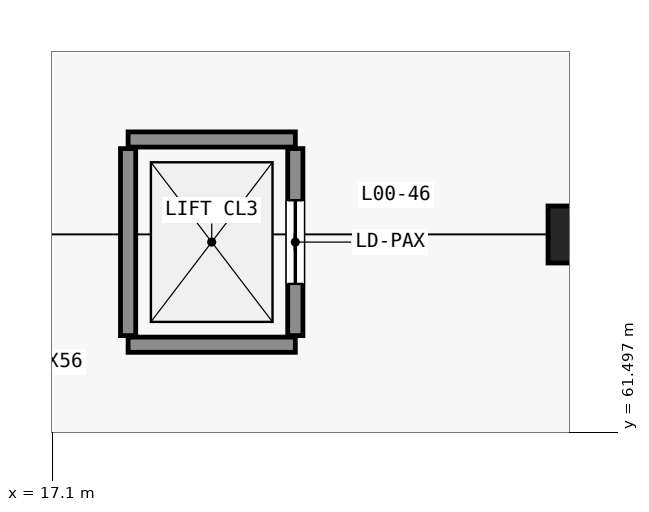
"""IFC4 building model, lengths in metres.
Left out: names, types, materials, properties, quantities, classifications, styles, units other than length and angle.
Written with IfcOpenShell. Run it as: python <this file> out.ifc"""

import sys

from ifc_helpers import new_model, si_unit, direction, frame, frame_2d, origin, origin_2d, place, context, subcontext, project, spatial, rectangle, extrude, element, fill, save


model = new_model("IFC4")
c1 = context("Model", 3, precision=1e-05, world=origin(), true_north=direction((0.0, 1.0)))
c2 = subcontext(c1, "Body", "Model", "MODEL_VIEW")
j1 = project(units=[si_unit("LENGTHUNIT", "METRE"), si_unit("PLANEANGLEUNIT", "RADIAN")], contexts=[c1])
p1 = place(None, origin())
s1 = spatial("IfcSite", under=j1, at=p1, CompositionType="ELEMENT")
p2 = place(p1, origin())
s2 = spatial("IfcBuilding", under=s1, at=p2, CompositionType="ELEMENT")
p3 = place(p2, origin())
s3 = spatial("IfcBuildingStorey", under=s2, at=p3, CompositionType="ELEMENT", Elevation=0.0)
p4 = place(p3, frame((24.0, 64.1, 0.0), z_axis=(0.0, 0.0, 1.0), x_axis=(1.0, 0.0, 0.0)))
e1 = element("IfcColumn", 1, at=p4, inside=s3, PredefinedType="COLUMN", context=c2, shape_type="SweptSolid", body=[
    extrude(rectangle(XDim=0.75, YDim=0.75, at=origin_2d()), origin(), (0.0, 0.0, 1.0), 6.0),
])
for number, where, z_axis, x_axis in (
    (2, (18.1, 62.65, 0.0), (0.0, 0.0, 1.0), (1.0, 0.0, 0.0)),
    (3, (18.1, 65.35, 0.0), (0.0, 0.0, 1.0), (1.0, 0.0, 0.0)),
):
    element("IfcWall", number, at=place(p3, frame(where, z_axis=z_axis, x_axis=x_axis)), inside=s3, PredefinedType="STANDARD", context=c2, shape_type="SweptSolid", body=[
        extrude(rectangle(XDim=2.2, YDim=0.2, at=frame_2d((1.1, 0.0))), origin(), (0.0, 0.0, 1.0), 5.64),
    ])
p5 = place(p3, frame((18.1, 62.77, 0.0), z_axis=(0.0, 0.0, 1.0), x_axis=(0.0, 1.0, 0.0)))
e4 = element("IfcWall", 4, at=p5, inside=s3, PredefinedType="STANDARD", context=c2, shape_type="SweptSolid", body=[
    extrude(rectangle(XDim=2.46, YDim=0.2, at=frame_2d((1.23, 0.0))), origin(), (0.0, 0.0, 1.0), 5.64),
])
p6 = place(p3, frame((20.3, 62.77, 0.0), z_axis=(0.0, 0.0, 1.0), x_axis=(0.0, 1.0, 0.0)))
e5 = element("IfcWall", 5, at=p6, inside=s3, PredefinedType="STANDARD", context=c2, shape_type="SweptSolid", body=[
    extrude(rectangle(XDim=2.46, YDim=0.2, at=frame_2d((1.23, 0.0))), origin(), (0.0, 0.0, 1.0), 5.64),
])
p7 = place(p6, frame((0.68, 0.0, 0.0)))
e6 = element("IfcOpeningElement", 6, at=p7, cuts=e5, PredefinedType="OPENING", context=c2, shape_type="SweptSolid", body=[
    extrude(rectangle(XDim=1.1, YDim=2.15, at=frame_2d((0.55, 1.075))), frame((0.0, 0.11, 0.0), z_axis=(0.0, -1.0, 0.0), x_axis=(1.0, 0.0, 0.0)), (0.0, 0.0, 1.0), 0.22),
])
p8 = place(p7, origin())
e7 = element("IfcDoor", 7, at=p8, inside=s3, OperationType="SLIDING_TO_LEFT", PredefinedType="DOOR", context=c2, shape_type="SweptSolid", body=[
    extrude(rectangle(XDim=1.1, YDim=2.15, at=frame_2d((0.55, 1.075))), frame((0.0, 0.025, 0.0), z_axis=(0.0, -1.0, 0.0), x_axis=(1.0, 0.0, 0.0)), (0.0, 0.0, 1.0), 0.05),
])
fill(e6, e7)
save(model, sys.argv[1])
